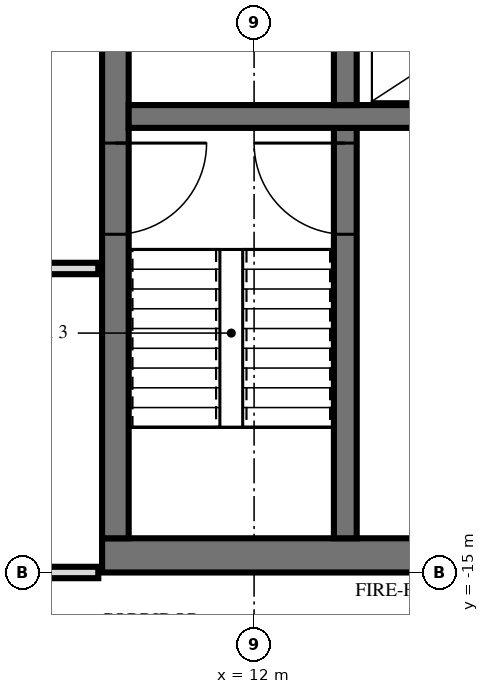
"""IFC4 building model, lengths in metres.
Left out: names, types, materials, properties, quantities, classifications, styles, units other than length and angle.
Written with IfcOpenShell. Run it as: python <this file> out.ifc"""

import sys

from ifc_helpers import new_model, si_unit, direction, frame, frame_2d, origin, place, context, subcontext, project, spatial, rectangle, extrude, element, fill, save


model = new_model("IFC4")
c1 = context("Model", 3, precision=1e-05, world=origin(), true_north=direction((0.0, 1.0)))
c2 = subcontext(c1, "Body", "Model", "MODEL_VIEW")
j1 = project(units=[si_unit("LENGTHUNIT", "METRE"), si_unit("PLANEANGLEUNIT", "RADIAN")], contexts=[c1])
p1 = place(None, origin())
s1 = spatial("IfcSite", under=j1, at=p1, CompositionType="ELEMENT")
p2 = place(p1, origin())
s2 = spatial("IfcBuilding", under=s1, at=p2, CompositionType="ELEMENT")
p3 = place(p2, frame((0.0, 0.0, 52.8)))
s3 = spatial("IfcBuildingStorey", under=s2, at=p3, CompositionType="ELEMENT", Elevation=52.8)
p4 = place(p3, frame((10.0, -14.775, 0.0), z_axis=(0.0, 0.0, 1.0), x_axis=(1.0, 0.0, 0.0)))
e1 = element("IfcWall", 1, at=p4, inside=s3, PredefinedType="SHEAR", context=c2, shape_type="SweptSolid", body=[
    extrude(rectangle(XDim=19.5, YDim=0.45, at=frame_2d((9.75, 0.0))), origin(), (0.0, 0.0, 1.0), 3.6),
])
p5 = place(p4, frame((7.1, 0.0, 0.0)))
e2 = element("IfcOpeningElement", 2, at=p5, cuts=e1, PredefinedType="OPENING", context=c2, shape_type="SweptSolid", body=[
    extrude(rectangle(XDim=1.2, YDim=2.1, at=frame_2d((0.6, 1.05))), frame((0.0, 0.235, 0.0), z_axis=(0.0, -1.0, 0.0), x_axis=(1.0, 0.0, 0.0)), (0.0, 0.0, 1.0), 0.47),
])
p6 = place(p4, frame((4.15, 0.0, 0.0)))
e3 = element("IfcOpeningElement", 3, at=p6, cuts=e1, PredefinedType="OPENING", context=c2, shape_type="SweptSolid", body=[
    extrude(rectangle(XDim=1.1, YDim=2.1, at=frame_2d((0.55, 1.05))), frame((0.0, 0.235, 0.0), z_axis=(0.0, -1.0, 0.0), x_axis=(1.0, 0.0, 0.0)), (0.0, 0.0, 1.0), 0.47),
])
p7 = place(p4, frame((10.1, 0.0, 0.0)))
e4 = element("IfcOpeningElement", 4, at=p7, cuts=e1, PredefinedType="OPENING", context=c2, shape_type="SweptSolid", body=[
    extrude(rectangle(XDim=0.9, YDim=2.1, at=frame_2d((0.45, 1.05))), frame((0.0, 0.235, 0.0), z_axis=(0.0, -1.0, 0.0), x_axis=(1.0, 0.0, 0.0)), (0.0, 0.0, 1.0), 0.47),
])
p8 = place(p4, frame((12.45, 0.0, 0.0)))
e5 = element("IfcOpeningElement", 5, at=p8, cuts=e1, PredefinedType="OPENING", context=c2, shape_type="SweptSolid", body=[
    extrude(rectangle(XDim=1.0, YDim=2.1, at=frame_2d((0.5, 1.05))), frame((0.0, 0.235, 0.0), z_axis=(0.0, -1.0, 0.0), x_axis=(1.0, 0.0, 0.0)), (0.0, 0.0, 1.0), 0.47),
])
p9 = place(p4, frame((15.087, 0.0, 0.0)))
e6 = element("IfcOpeningElement", 6, at=p9, cuts=e1, PredefinedType="OPENING", context=c2, shape_type="SweptSolid", body=[
    extrude(rectangle(XDim=1.0, YDim=2.1, at=frame_2d((0.5, 1.05))), frame((0.0, 0.235, 0.0), z_axis=(0.0, -1.0, 0.0), x_axis=(1.0, 0.0, 0.0)), (0.0, 0.0, 1.0), 0.47),
])
p10 = place(p4, frame((17.413, 0.0, 0.0)))
e7 = element("IfcOpeningElement", 7, at=p10, cuts=e1, PredefinedType="OPENING", context=c2, shape_type="SweptSolid", body=[
    extrude(rectangle(XDim=1.0, YDim=2.1, at=frame_2d((0.5, 1.05))), frame((0.0, 0.235, 0.0), z_axis=(0.0, -1.0, 0.0), x_axis=(1.0, 0.0, 0.0)), (0.0, 0.0, 1.0), 0.47),
])
p11 = place(p3, frame((10.175, -14.55, 0.0), z_axis=(0.0, 0.0, 1.0), x_axis=(0.0, 1.0, 0.0)))
e8 = element("IfcWall", 8, at=p11, inside=s3, PredefinedType="SHEAR", context=c2, shape_type="SweptSolid", body=[
    extrude(rectangle(XDim=14.1, YDim=0.35, at=frame_2d((7.05, 0.0))), origin(), (0.0, 0.0, 1.0), 3.6),
])
p12 = place(p11, frame((8.4, 0.0, 0.0)))
e9 = element("IfcOpeningElement", 9, at=p12, cuts=e8, PredefinedType="OPENING", context=c2, shape_type="SweptSolid", body=[
    extrude(rectangle(XDim=1.4, YDim=2.4, at=frame_2d((0.7, 1.2))), frame((0.0, 0.185, 0.0), z_axis=(0.0, -1.0, 0.0), x_axis=(1.0, 0.0, 0.0)), (0.0, 0.0, 1.0), 0.37),
])
p13 = place(p11, frame((10.0, 0.0, 0.0)))
e10 = element("IfcOpeningElement", 10, at=p13, cuts=e8, PredefinedType="OPENING", context=c2, shape_type="SweptSolid", body=[
    extrude(rectangle(XDim=1.4, YDim=2.4, at=frame_2d((0.7, 1.2))), frame((0.0, 0.185, 0.0), z_axis=(0.0, -1.0, 0.0), x_axis=(1.0, 0.0, 0.0)), (0.0, 0.0, 1.0), 0.37),
])
p14 = place(p11, frame((4.0, 0.0, 0.0)))
e11 = element("IfcOpeningElement", 11, at=p14, cuts=e8, PredefinedType="OPENING", context=c2, shape_type="SweptSolid", body=[
    extrude(rectangle(XDim=1.2, YDim=2.1, at=frame_2d((0.6, 1.05))), frame((0.0, 0.185, 0.0), z_axis=(0.0, -1.0, 0.0), x_axis=(1.0, 0.0, 0.0)), (0.0, 0.0, 1.0), 0.37),
])
p15 = place(p3, frame((10.35, -9.0, 0.0), z_axis=(0.0, 0.0, 1.0), x_axis=(1.0, 0.0, 0.0)))
e12 = element("IfcWall", 12, at=p15, inside=s3, PredefinedType="SHEAR", context=c2, shape_type="SweptSolid", body=[
    extrude(rectangle(XDim=18.7, YDim=0.3, at=frame_2d((9.35, 0.0))), origin(), (0.0, 0.0, 1.0), 3.6),
])
p16 = place(p15, frame((3.8, 0.0, 0.0)))
e13 = element("IfcOpeningElement", 13, at=p16, cuts=e12, PredefinedType="OPENING", context=c2, shape_type="SweptSolid", body=[
    extrude(rectangle(XDim=1.1, YDim=2.1, at=frame_2d((0.55, 1.05))), frame((0.0, 0.16, 0.0), z_axis=(0.0, -1.0, 0.0), x_axis=(1.0, 0.0, 0.0)), (0.0, 0.0, 1.0), 0.32),
])
p17 = place(p3, frame((13.2, -8.85, 0.0), z_axis=(0.0, 0.0, 1.0), x_axis=(0.0, 1.0, 0.0)))
e14 = element("IfcWall", 14, at=p17, inside=s3, PredefinedType="SHEAR", context=c2, shape_type="SweptSolid", body=[
    extrude(rectangle(XDim=2.3, YDim=0.3, at=frame_2d((1.15, 0.0))), origin(), (0.0, 0.0, 1.0), 3.6),
])
p18 = place(p3, frame((13.2, -14.55, 0.0), z_axis=(0.0, 0.0, 1.0), x_axis=(0.0, 1.0, 0.0)))
e15 = element("IfcWall", 15, at=p18, inside=s3, PredefinedType="SHEAR", context=c2, shape_type="SweptSolid", body=[
    extrude(rectangle(XDim=5.4, YDim=0.3, at=frame_2d((2.7, 0.0))), origin(), (0.0, 0.0, 1.0), 3.6),
])
p19 = place(p18, frame((4.0, 0.0, 0.0)))
e16 = element("IfcOpeningElement", 16, at=p19, cuts=e15, PredefinedType="OPENING", context=c2, shape_type="SweptSolid", body=[
    extrude(rectangle(XDim=1.2, YDim=2.1, at=frame_2d((0.6, 1.05))), frame((0.0, 0.16, 0.0), z_axis=(0.0, -1.0, 0.0), x_axis=(1.0, 0.0, 0.0)), (0.0, 0.0, 1.0), 0.32),
])
p20 = place(p3, frame((-9.95, -15.0, 0.0), z_axis=(0.0, 0.0, 1.0), x_axis=(1.0, 0.0, 0.0)))
e17 = element("IfcWall", 17, at=p20, inside=s3, PredefinedType="PARTITIONING", context=c2, shape_type="SweptSolid", body=[
    extrude(rectangle(XDim=19.9, YDim=0.15, at=frame_2d((9.95, 0.0))), origin(), (0.0, 0.0, 1.0), 2.684),
])
p21 = place(p20, frame((9.45, 0.0, 0.0)))
e18 = element("IfcOpeningElement", 18, at=p21, cuts=e17, PredefinedType="OPENING", context=c2, shape_type="SweptSolid", body=[
    extrude(rectangle(XDim=1.0, YDim=2.1, at=frame_2d((0.5, 1.05))), frame((0.0, 0.085, 0.0), z_axis=(0.0, -1.0, 0.0), x_axis=(1.0, 0.0, 0.0)), (0.0, 0.0, 1.0), 0.17),
])
p22 = place(p3, frame((-9.95, -11.0, 0.0), z_axis=(0.0, 0.0, 1.0), x_axis=(1.0, 0.0, 0.0)))
e19 = element("IfcWall", 19, at=p22, inside=s3, PredefinedType="PARTITIONING", context=c2, shape_type="SweptSolid", body=[
    extrude(rectangle(XDim=19.9, YDim=0.15, at=frame_2d((9.95, 0.0))), origin(), (0.0, 0.0, 1.0), 3.32),
])
p23 = place(p22, frame((9.45, 0.0, 0.0)))
e20 = element("IfcOpeningElement", 20, at=p23, cuts=e19, PredefinedType="OPENING", context=c2, shape_type="SweptSolid", body=[
    extrude(rectangle(XDim=1.0, YDim=2.1, at=frame_2d((0.5, 1.05))), frame((0.0, 0.085, 0.0), z_axis=(0.0, -1.0, 0.0), x_axis=(1.0, 0.0, 0.0)), (0.0, 0.0, 1.0), 0.17),
])
p24 = place(p22, frame((15.45, 0.0, 0.0)))
e21 = element("IfcOpeningElement", 21, at=p24, cuts=e19, PredefinedType="OPENING", context=c2, shape_type="SweptSolid", body=[
    extrude(rectangle(XDim=1.0, YDim=2.1, at=frame_2d((0.5, 1.05))), frame((0.0, 0.085, 0.0), z_axis=(0.0, -1.0, 0.0), x_axis=(1.0, 0.0, 0.0)), (0.0, 0.0, 1.0), 0.17),
])
p25 = place(p14, frame((0.6, 0.0, 0.0), z_axis=(0.0, 0.0, 1.0), x_axis=(-1.0, 0.0, 0.0)))
e22 = element("IfcDoor", 22, at=p25, inside=s3, OperationType="SINGLE_SWING_RIGHT", PredefinedType="DOOR", context=c2, shape_type="SweptSolid", body=[
    extrude(rectangle(XDim=1.2, YDim=2.1, at=frame_2d((0.0, 1.05))), frame((0.0, -0.025, 0.0), z_axis=(0.0, 1.0, 0.0), x_axis=(-1.0, 0.0, 0.0)), (0.0, 0.0, 1.0), 0.05),
])
fill(e11, e22)
p26 = place(p19, origin())
e23 = element("IfcDoor", 23, at=p26, inside=s3, OperationType="SINGLE_SWING_LEFT", PredefinedType="DOOR", context=c2, shape_type="SweptSolid", body=[
    extrude(rectangle(XDim=1.2, YDim=2.1, at=frame_2d((0.6, 1.05))), frame((0.0, 0.025, 0.0), z_axis=(0.0, -1.0, 0.0), x_axis=(1.0, 0.0, 0.0)), (0.0, 0.0, 1.0), 0.05),
])
fill(e16, e23)
save(model, sys.argv[1])
